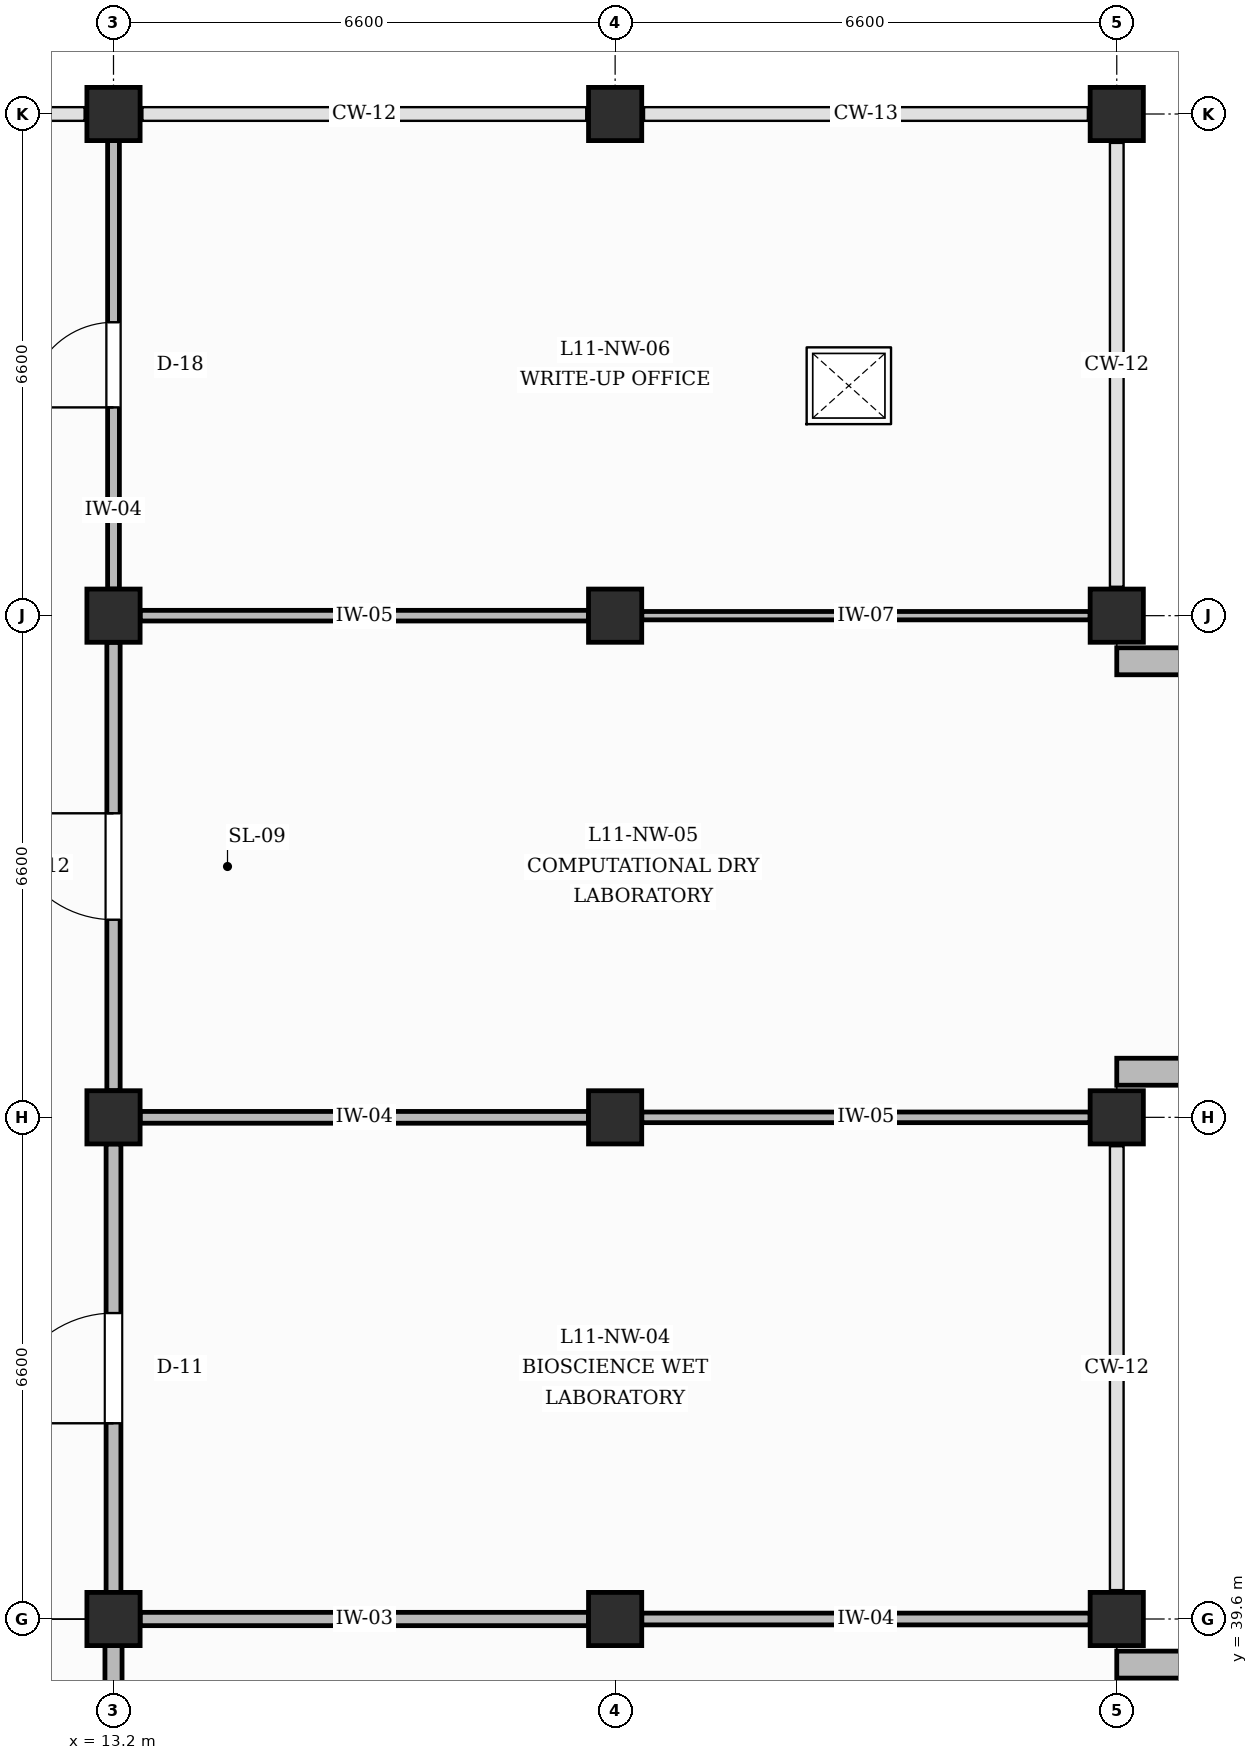
"""IFC4 building model, lengths in metres.
Left out: names, types, materials, properties, quantities, classifications, styles, units other than length and angle.
Written with IfcOpenShell. Run it as: python <this file> out.ifc"""

import sys

from ifc_helpers import new_model, si_unit, direction, frame, frame_2d, origin, origin_2d, place, context, subcontext, project, spatial, rectangle, extrude, element, fill, save


model = new_model("IFC4")
c1 = context("Model", 3, precision=1e-05, world=origin(), true_north=direction((0.0, 1.0)))
c2 = subcontext(c1, "Body", "Model", "MODEL_VIEW")
j1 = project(units=[si_unit("LENGTHUNIT", "METRE"), si_unit("PLANEANGLEUNIT", "RADIAN")], contexts=[c1])
p1 = place(None, origin())
s1 = spatial("IfcSite", under=j1, at=p1, CompositionType="ELEMENT")
p2 = place(p1, origin())
s2 = spatial("IfcBuilding", under=s1, at=p2, CompositionType="ELEMENT")
p3 = place(p2, frame((0.0, 0.0, 48.0)))
s3 = spatial("IfcBuildingStorey", under=s2, at=p3, CompositionType="ELEMENT", Elevation=48.0)
for number, where, z_axis, x_axis in (
    (1, (13.2, 39.6, 0.0), (0.0, 0.0, 1.0), (1.0, 0.0, 0.0)),
    (2, (13.2, 46.2, 0.0), (0.0, 0.0, 1.0), (1.0, 0.0, 0.0)),
    (3, (13.2, 52.8, 0.0), (0.0, 0.0, 1.0), (1.0, 0.0, 0.0)),
    (4, (13.2, 59.4, 0.0), (0.0, 0.0, 1.0), (1.0, 0.0, 0.0)),
    (5, (19.8, 39.6, 0.0), (0.0, 0.0, 1.0), (1.0, 0.0, 0.0)),
    (6, (19.8, 46.2, 0.0), (0.0, 0.0, 1.0), (1.0, 0.0, 0.0)),
    (7, (19.8, 52.8, 0.0), (0.0, 0.0, 1.0), (1.0, 0.0, 0.0)),
    (8, (19.8, 59.4, 0.0), (0.0, 0.0, 1.0), (1.0, 0.0, 0.0)),
    (9, (26.4, 39.6, 0.0), (0.0, 0.0, 1.0), (1.0, 0.0, 0.0)),
    (10, (26.4, 46.2, 0.0), (0.0, 0.0, 1.0), (1.0, 0.0, 0.0)),
    (11, (26.4, 52.8, 0.0), (0.0, 0.0, 1.0), (1.0, 0.0, 0.0)),
    (12, (26.4, 59.4, 0.0), (0.0, 0.0, 1.0), (1.0, 0.0, 0.0)),
):
    element("IfcColumn", number, at=place(p3, frame(where, z_axis=z_axis, x_axis=x_axis)), inside=s3, PredefinedType="COLUMN", context=c2, shape_type="SweptSolid", body=[
        extrude(rectangle(XDim=0.7, YDim=0.7, at=origin_2d()), origin(), (0.0, 0.0, 1.0), 4.2),
    ])
for number, where, z_axis, x_axis in (
    (13, (26.4, 39.0, 0.0), (0.0, 0.0, 1.0), (1.0, 0.0, 0.0)),
    (14, (26.4, 46.8, 0.0), (0.0, 0.0, 1.0), (1.0, 0.0, 0.0)),
    (15, (26.4, 52.2, 0.0), (0.0, 0.0, 1.0), (1.0, 0.0, 0.0)),
):
    element("IfcWall", number, at=place(p3, frame(where, z_axis=z_axis, x_axis=x_axis)), inside=s3, PredefinedType="SOLIDWALL", context=c2, shape_type="SweptSolid", body=[
        extrude(rectangle(XDim=2.0, YDim=0.355, at=frame_2d((1.0, 0.0))), origin(), (0.0, 0.0, 1.0), 3.29),
    ])
p4 = place(p3, frame((13.2, 33.35, 0.0), z_axis=(0.0, 0.0, 1.0), x_axis=(0.0, 1.0, 0.0)))
e16 = element("IfcWall", 16, at=p4, inside=s3, PredefinedType="PARTITIONING", context=c2, shape_type="SweptSolid", body=[
    extrude(rectangle(XDim=5.9, YDim=0.225, at=frame_2d((2.95, 0.0))), origin(), (0.0, 0.0, 1.0), 3.29),
])
p5 = place(p4, frame((2.46, 0.0, 0.0)))
e17 = element("IfcOpeningElement", 17, at=p5, cuts=e16, PredefinedType="OPENING", context=c2, shape_type="SweptSolid", body=[
    extrude(rectangle(XDim=0.98, YDim=2.15, at=frame_2d((0.49, 1.075))), frame((0.0, 0.123, 0.0), z_axis=(0.0, -1.0, 0.0), x_axis=(1.0, 0.0, 0.0)), (0.0, 0.0, 1.0), 0.245),
])
p6 = place(p3, frame((13.2, 39.95, 0.0), z_axis=(0.0, 0.0, 1.0), x_axis=(0.0, 1.0, 0.0)))
e18 = element("IfcWall", 18, at=p6, inside=s3, PredefinedType="PARTITIONING", context=c2, shape_type="SweptSolid", body=[
    extrude(rectangle(XDim=5.9, YDim=0.195, at=frame_2d((2.95, 0.0))), origin(), (0.0, 0.0, 1.0), 3.29),
])
p7 = place(p6, frame((2.225, 0.0, 0.0)))
e19 = element("IfcOpeningElement", 19, at=p7, cuts=e18, PredefinedType="OPENING", context=c2, shape_type="SweptSolid", body=[
    extrude(rectangle(XDim=1.45, YDim=2.25, at=frame_2d((0.725, 1.125))), frame((0.0, 0.107, 0.0), z_axis=(0.0, -1.0, 0.0), x_axis=(1.0, 0.0, 0.0)), (0.0, 0.0, 1.0), 0.215),
])
p8 = place(p3, frame((13.2, 46.55, 0.0), z_axis=(0.0, 0.0, 1.0), x_axis=(0.0, 1.0, 0.0)))
e20 = element("IfcWall", 20, at=p8, inside=s3, PredefinedType="PARTITIONING", context=c2, shape_type="SweptSolid", body=[
    extrude(rectangle(XDim=5.9, YDim=0.175, at=frame_2d((2.95, 0.0))), origin(), (0.0, 0.0, 1.0), 3.29),
])
p9 = place(p8, frame((2.25, 0.0, 0.0)))
e21 = element("IfcOpeningElement", 21, at=p9, cuts=e20, PredefinedType="OPENING", context=c2, shape_type="SweptSolid", body=[
    extrude(rectangle(XDim=1.4, YDim=2.25, at=frame_2d((0.7, 1.125))), frame((0.0, 0.097, 0.0), z_axis=(0.0, -1.0, 0.0), x_axis=(1.0, 0.0, 0.0)), (0.0, 0.0, 1.0), 0.195),
])
p10 = place(p3, frame((13.2, 53.15, 0.0), z_axis=(0.0, 0.0, 1.0), x_axis=(0.0, 1.0, 0.0)))
e22 = element("IfcWall", 22, at=p10, inside=s3, PredefinedType="PARTITIONING", context=c2, shape_type="SweptSolid", body=[
    extrude(rectangle(XDim=5.9, YDim=0.155, at=frame_2d((2.95, 0.0))), origin(), (0.0, 0.0, 1.0), 3.29),
])
p11 = place(p10, frame((2.39, 0.0, 0.0)))
e23 = element("IfcOpeningElement", 23, at=p11, cuts=e22, PredefinedType="OPENING", context=c2, shape_type="SweptSolid", body=[
    extrude(rectangle(XDim=1.12, YDim=2.2, at=frame_2d((0.56, 1.1))), frame((0.0, 0.087, 0.0), z_axis=(0.0, -1.0, 0.0), x_axis=(1.0, 0.0, 0.0)), (0.0, 0.0, 1.0), 0.175),
])
p12 = place(p3, frame((13.55, 39.6, 0.0), z_axis=(0.0, 0.0, 1.0), x_axis=(1.0, 0.0, 0.0)))
e24 = element("IfcWall", 24, at=p12, inside=s3, PredefinedType="PARTITIONING", context=c2, shape_type="SweptSolid", body=[
    extrude(rectangle(XDim=5.9, YDim=0.175, at=frame_2d((2.95, 0.0))), origin(), (0.0, 0.0, 1.0), 3.29),
])
p13 = place(p3, frame((13.55, 46.2, 0.0), z_axis=(0.0, 0.0, 1.0), x_axis=(1.0, 0.0, 0.0)))
e25 = element("IfcWall", 25, at=p13, inside=s3, PredefinedType="PARTITIONING", context=c2, shape_type="SweptSolid", body=[
    extrude(rectangle(XDim=5.9, YDim=0.155, at=frame_2d((2.95, 0.0))), origin(), (0.0, 0.0, 1.0), 3.29),
])
p14 = place(p3, frame((13.55, 52.8, 0.0), z_axis=(0.0, 0.0, 1.0), x_axis=(1.0, 0.0, 0.0)))
e26 = element("IfcWall", 26, at=p14, inside=s3, PredefinedType="PARTITIONING", context=c2, shape_type="SweptSolid", body=[
    extrude(rectangle(XDim=5.9, YDim=0.14, at=frame_2d((2.95, 0.0))), origin(), (0.0, 0.0, 1.0), 3.29),
])
p15 = place(p3, frame((20.15, 39.6, 0.0), z_axis=(0.0, 0.0, 1.0), x_axis=(1.0, 0.0, 0.0)))
e27 = element("IfcWall", 27, at=p15, inside=s3, PredefinedType="PARTITIONING", context=c2, shape_type="SweptSolid", body=[
    extrude(rectangle(XDim=5.9, YDim=0.155, at=frame_2d((2.95, 0.0))), origin(), (0.0, 0.0, 1.0), 3.44),
])
p16 = place(p3, frame((20.15, 46.2, 0.0), z_axis=(0.0, 0.0, 1.0), x_axis=(1.0, 0.0, 0.0)))
e28 = element("IfcWall", 28, at=p16, inside=s3, PredefinedType="PARTITIONING", context=c2, shape_type="SweptSolid", body=[
    extrude(rectangle(XDim=5.9, YDim=0.14, at=frame_2d((2.95, 0.0))), origin(), (0.0, 0.0, 1.0), 3.44),
])
p17 = place(p3, frame((20.15, 52.8, 0.0), z_axis=(0.0, 0.0, 1.0), x_axis=(1.0, 0.0, 0.0)))
e29 = element("IfcWall", 29, at=p17, inside=s3, PredefinedType="PARTITIONING", context=c2, shape_type="SweptSolid", body=[
    extrude(rectangle(XDim=5.9, YDim=0.11, at=frame_2d((2.95, 0.0))), origin(), (0.0, 0.0, 1.0), 3.44),
])
p18 = place(p7, origin())
e30 = element("IfcDoor", 30, at=p18, inside=s3, OperationType="SINGLE_SWING_LEFT", PredefinedType="DOOR", context=c2, shape_type="SweptSolid", body=[
    extrude(rectangle(XDim=1.45, YDim=2.25, at=frame_2d((0.725, 1.125))), frame((0.0, 0.025, 0.0), z_axis=(0.0, -1.0, 0.0), x_axis=(1.0, 0.0, 0.0)), (0.0, 0.0, 1.0), 0.05),
])
fill(e19, e30)
p19 = place(p9, origin())
e31 = element("IfcDoor", 31, at=p19, inside=s3, OperationType="SINGLE_SWING_RIGHT", PredefinedType="DOOR", context=c2, shape_type="SweptSolid", body=[
    extrude(rectangle(XDim=1.4, YDim=2.25, at=frame_2d((0.7, 1.125))), frame((0.0, 0.025, 0.0), z_axis=(0.0, -1.0, 0.0), x_axis=(1.0, 0.0, 0.0)), (0.0, 0.0, 1.0), 0.05),
])
fill(e21, e31)
p20 = place(p11, origin())
e32 = element("IfcDoor", 32, at=p20, inside=s3, OperationType="SINGLE_SWING_LEFT", PredefinedType="DOOR", context=c2, shape_type="SweptSolid", body=[
    extrude(rectangle(XDim=1.12, YDim=2.2, at=frame_2d((0.56, 1.1))), frame((0.0, 0.025, 0.0), z_axis=(0.0, -1.0, 0.0), x_axis=(1.0, 0.0, 0.0)), (0.0, 0.0, 1.0), 0.05),
])
fill(e23, e32)
save(model, sys.argv[1])
